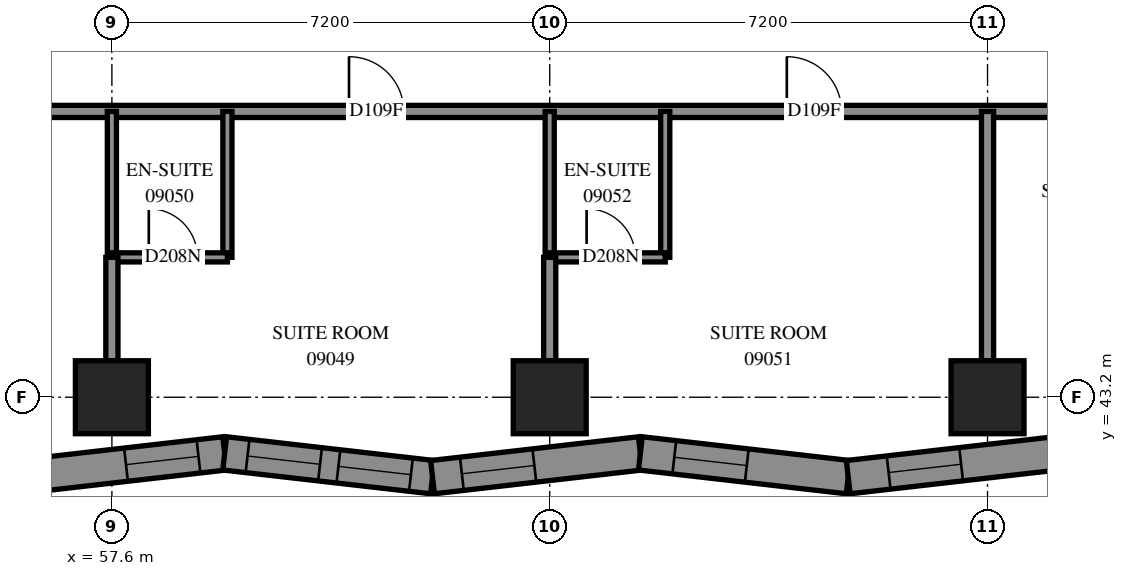
"""IFC4 building model, lengths in metres.
Left out: names, types, materials, properties, quantities, classifications, styles, units other than length and angle.
Written with IfcOpenShell. Run it as: python <this file> out.ifc"""

import sys

from ifc_helpers import new_model, si_unit, direction, frame, frame_2d, origin, origin_2d, place, context, subcontext, project, spatial, polyline, rectangle, outline, extrude, element, fill, save


model = new_model("IFC4")
c1 = context("Model", 3, precision=1e-05, world=origin(), true_north=direction((0.0, 1.0)))
c2 = subcontext(c1, "Body", "Model", "MODEL_VIEW")
j1 = project(units=[si_unit("LENGTHUNIT", "METRE"), si_unit("PLANEANGLEUNIT", "RADIAN")], contexts=[c1])
p1 = place(None, origin())
s1 = spatial("IfcSite", under=j1, at=p1, CompositionType="ELEMENT")
p2 = place(p1, origin())
s2 = spatial("IfcBuilding", under=s1, at=p2, CompositionType="ELEMENT")
p3 = place(p2, frame((0.0, 0.0, 37.2)))
s3 = spatial("IfcBuildingStorey", under=s2, at=p3, CompositionType="ELEMENT", Elevation=37.2)
for number, where, z_axis, x_axis in (
    (1, (57.6, 43.2, 0.0), (0.0, 0.0, 1.0), (1.0, 0.0, 0.0)),
    (2, (64.8, 43.2, 0.0), (0.0, 0.0, 1.0), (1.0, 0.0, 0.0)),
    (3, (72.0, 43.2, 0.0), (0.0, 0.0, 1.0), (1.0, 0.0, 0.0)),
):
    element("IfcColumn", number, at=place(p3, frame(where, z_axis=z_axis, x_axis=x_axis)), inside=s3, PredefinedType="COLUMN", context=c2, shape_type="SweptSolid", body=[
        extrude(rectangle(XDim=1.2, YDim=1.2, at=origin_2d()), origin(), (0.0, 0.0, 1.0), 3.1),
    ])
p4 = place(p3, frame((56.036, 41.886, 0.0), z_axis=(0.0, 0.0, 1.0), x_axis=(0.9935208627, 0.1136498807, 0.0)))
e4 = element("IfcWall", 4, at=p4, inside=s3, PredefinedType="SOLIDWALL", context=c2, shape_type="SweptSolid", body=[
    extrude(outline(polyline([(-0.032, -0.275), (3.409, -0.275), (3.472, 0.275), (0.032, 0.275), (-0.032, -0.275)])), origin(), (0.0, 0.0, 1.0), 3.1),
])
p5 = place(p4, frame((1.807, 0.0, 0.5)))
e5 = element("IfcOpeningElement", 5, at=p5, cuts=e4, PredefinedType="OPENING", context=c2, shape_type="SweptSolid", body=[
    extrude(rectangle(XDim=1.2, YDim=2.45, at=frame_2d((0.6, 1.225))), frame((0.0, 0.285, 0.0), z_axis=(0.0, -1.0, 0.0), x_axis=(1.0, 0.0, 0.0)), (0.0, 0.0, 1.0), 0.57),
])
p6 = place(p3, frame((59.455, 42.277, 0.0), z_axis=(0.0, 0.0, 1.0), x_axis=(0.9935212381, -0.1136465988, 0.0)))
e6 = element("IfcWall", 6, at=p6, inside=s3, PredefinedType="SOLIDWALL", context=c2, shape_type="SweptSolid", body=[
    extrude(outline(polyline([(0.032, -0.275), (3.472, -0.275), (3.409, 0.275), (-0.032, 0.275), (0.032, -0.275)])), origin(), (0.0, 0.0, 1.0), 3.1),
])
p7 = place(p6, frame((0.378, 0.0, 0.5)))
e7 = element("IfcOpeningElement", 7, at=p7, cuts=e6, PredefinedType="OPENING", context=c2, shape_type="SweptSolid", body=[
    extrude(rectangle(XDim=1.2, YDim=2.45, at=frame_2d((0.6, 1.225))), frame((0.0, 0.285, 0.0), z_axis=(0.0, -1.0, 0.0), x_axis=(1.0, 0.0, 0.0)), (0.0, 0.0, 1.0), 0.57),
])
p8 = place(p6, frame((1.883, 0.0, 0.5)))
e8 = element("IfcOpeningElement", 8, at=p8, cuts=e6, PredefinedType="OPENING", context=c2, shape_type="SweptSolid", body=[
    extrude(rectangle(XDim=1.2, YDim=2.45, at=frame_2d((0.6, 1.225))), frame((0.0, 0.285, 0.0), z_axis=(0.0, -1.0, 0.0), x_axis=(1.0, 0.0, 0.0)), (0.0, 0.0, 1.0), 0.57),
])
p9 = place(p3, frame((62.873, 41.886, 0.0), z_axis=(0.0, 0.0, 1.0), x_axis=(0.9935212381, 0.1136465988, 0.0)))
e9 = element("IfcWall", 9, at=p9, inside=s3, PredefinedType="SOLIDWALL", context=c2, shape_type="SweptSolid", body=[
    extrude(outline(polyline([(-0.032, -0.275), (3.409, -0.275), (3.472, 0.275), (0.032, 0.275), (-0.032, -0.275)])), origin(), (0.0, 0.0, 1.0), 3.1),
])
p10 = place(p9, frame((0.486, 0.0, 0.5)))
e10 = element("IfcOpeningElement", 10, at=p10, cuts=e9, PredefinedType="OPENING", context=c2, shape_type="SweptSolid", body=[
    extrude(rectangle(XDim=1.2, YDim=2.45, at=frame_2d((0.6, 1.225))), frame((0.0, 0.285, 0.0), z_axis=(0.0, -1.0, 0.0), x_axis=(1.0, 0.0, 0.0)), (0.0, 0.0, 1.0), 0.57),
])
p11 = place(p3, frame((66.291, 42.277, 0.0), z_axis=(0.0, 0.0, 1.0), x_axis=(0.9935212381, -0.1136465988, 0.0)))
e11 = element("IfcWall", 11, at=p11, inside=s3, PredefinedType="SOLIDWALL", context=c2, shape_type="SweptSolid", body=[
    extrude(outline(polyline([(0.032, -0.275), (3.472, -0.275), (3.409, 0.275), (-0.032, 0.275), (0.032, -0.275)])), origin(), (0.0, 0.0, 1.0), 3.1),
])
p12 = place(p11, frame((0.561, 0.0, 0.5)))
e12 = element("IfcOpeningElement", 12, at=p12, cuts=e11, PredefinedType="OPENING", context=c2, shape_type="SweptSolid", body=[
    extrude(rectangle(XDim=1.2, YDim=2.45, at=frame_2d((0.6, 1.225))), frame((0.0, 0.285, 0.0), z_axis=(0.0, -1.0, 0.0), x_axis=(1.0, 0.0, 0.0)), (0.0, 0.0, 1.0), 0.57),
])
p13 = place(p3, frame((69.709, 41.886, 0.0), z_axis=(0.0, 0.0, 1.0), x_axis=(0.9935208506, 0.1136499866, 0.0)))
e13 = element("IfcWall", 13, at=p13, inside=s3, PredefinedType="SOLIDWALL", context=c2, shape_type="SweptSolid", body=[
    extrude(outline(polyline([(-0.032, -0.275), (3.409, -0.275), (3.519, 0.275), (0.032, 0.275), (-0.032, -0.275)])), origin(), (0.0, 0.0, 1.0), 3.1),
])
p14 = place(p13, frame((0.669, 0.0, 0.5)))
e14 = element("IfcOpeningElement", 14, at=p14, cuts=e13, PredefinedType="OPENING", context=c2, shape_type="SweptSolid", body=[
    extrude(rectangle(XDim=1.2, YDim=2.45, at=frame_2d((0.6, 1.225))), frame((0.0, 0.285, 0.0), z_axis=(0.0, -1.0, 0.0), x_axis=(1.0, 0.0, 0.0)), (0.0, 0.0, 1.0), 0.57),
])
p15 = place(p3, frame((55.1, 47.9, 0.0), z_axis=(0.0, 0.0, 1.0), x_axis=(1.0, 0.0, 0.0)))
e15 = element("IfcWall", 15, at=p15, inside=s3, PredefinedType="PARTITIONING", context=c2, shape_type="SweptSolid", body=[
    extrude(rectangle(XDim=19.204, YDim=0.2, at=frame_2d((9.602, 0.0))), origin(), (0.0, 0.0, 1.0), 3.1),
])
p16 = place(p15, frame((6.399, 0.0, 0.0)))
e16 = element("IfcOpeningElement", 16, at=p16, cuts=e15, PredefinedType="OPENING", context=c2, shape_type="SweptSolid", body=[
    extrude(rectangle(XDim=0.9, YDim=2.1, at=frame_2d((0.45, 1.05))), frame((0.0, 0.11, 0.0), z_axis=(0.0, -1.0, 0.0), x_axis=(1.0, 0.0, 0.0)), (0.0, 0.0, 1.0), 0.22),
])
p17 = place(p15, frame((13.599, 0.0, 0.0)))
e17 = element("IfcOpeningElement", 17, at=p17, cuts=e15, PredefinedType="OPENING", context=c2, shape_type="SweptSolid", body=[
    extrude(rectangle(XDim=0.9, YDim=2.1, at=frame_2d((0.45, 1.05))), frame((0.0, 0.11, 0.0), z_axis=(0.0, -1.0, 0.0), x_axis=(1.0, 0.0, 0.0)), (0.0, 0.0, 1.0), 0.22),
])
p18 = place(p3, frame((72.0, 43.8, 0.0), z_axis=(0.0, 0.0, 1.0), x_axis=(0.0, 1.0, 0.0)))
e18 = element("IfcWall", 18, at=p18, inside=s3, PredefinedType="PARTITIONING", context=c2, shape_type="SweptSolid", body=[
    extrude(rectangle(XDim=4.1, YDim=0.2, at=frame_2d((2.05, 0.0))), origin(), (0.0, 0.0, 1.0), 3.1),
])
for number, where, z_axis, x_axis in (
    (19, (59.5, 45.5, 0.0), (0.0, 0.0, 1.0), (0.0, 1.0, 0.0)),
    (20, (57.6, 45.5, 0.0), (0.0, 0.0, 1.0), (0.0, 1.0, 0.0)),
    (21, (66.7, 45.5, 0.0), (0.0, 0.0, 1.0), (0.0, 1.0, 0.0)),
    (22, (64.8, 45.5, 0.0), (0.0, 0.0, 1.0), (0.0, 1.0, 0.0)),
):
    element("IfcWall", number, at=place(p3, frame(where, z_axis=z_axis, x_axis=x_axis)), inside=s3, PredefinedType="PARTITIONING", context=c2, shape_type="SweptSolid", body=[
        extrude(rectangle(XDim=2.4, YDim=0.15, at=frame_2d((1.2, 0.0))), origin(), (0.0, 0.0, 1.0), 3.1),
    ])
p19 = place(p3, frame((64.8, 45.5, 0.0), z_axis=(0.0, 0.0, 1.0), x_axis=(1.0, 0.0, 0.0)))
e23 = element("IfcWall", 23, at=p19, inside=s3, PredefinedType="PARTITIONING", context=c2, shape_type="SweptSolid", body=[
    extrude(rectangle(XDim=1.9, YDim=0.15, at=frame_2d((0.95, 0.0))), origin(), (0.0, 0.0, 1.0), 3.1),
])
p20 = place(p19, frame((0.607, 0.0, 0.0)))
e24 = element("IfcOpeningElement", 24, at=p20, cuts=e23, PredefinedType="OPENING", context=c2, shape_type="SweptSolid", body=[
    extrude(rectangle(XDim=0.8, YDim=2.1, at=frame_2d((0.4, 1.05))), frame((0.0, 0.085, 0.0), z_axis=(0.0, -1.0, 0.0), x_axis=(1.0, 0.0, 0.0)), (0.0, 0.0, 1.0), 0.17),
])
p21 = place(p3, frame((57.6, 45.5, 0.0), z_axis=(0.0, 0.0, 1.0), x_axis=(1.0, 0.0, 0.0)))
e25 = element("IfcWall", 25, at=p21, inside=s3, PredefinedType="PARTITIONING", context=c2, shape_type="SweptSolid", body=[
    extrude(rectangle(XDim=1.9, YDim=0.15, at=frame_2d((0.95, 0.0))), origin(), (0.0, 0.0, 1.0), 3.1),
])
p22 = place(p21, frame((0.607, 0.0, 0.0)))
e26 = element("IfcOpeningElement", 26, at=p22, cuts=e25, PredefinedType="OPENING", context=c2, shape_type="SweptSolid", body=[
    extrude(rectangle(XDim=0.8, YDim=2.1, at=frame_2d((0.4, 1.05))), frame((0.0, 0.085, 0.0), z_axis=(0.0, -1.0, 0.0), x_axis=(1.0, 0.0, 0.0)), (0.0, 0.0, 1.0), 0.17),
])
for number, where, z_axis, x_axis in (
    (27, (57.6, 43.8, 0.0), (0.0, 0.0, 1.0), (0.0, 1.0, 0.0)),
    (28, (64.8, 43.8, 0.0), (0.0, 0.0, 1.0), (0.0, 1.0, 0.0)),
):
    element("IfcWall", number, at=place(p3, frame(where, z_axis=z_axis, x_axis=x_axis)), inside=s3, PredefinedType="PARTITIONING", context=c2, shape_type="SweptSolid", body=[
        extrude(rectangle(XDim=1.7, YDim=0.2, at=frame_2d((0.85, 0.0))), origin(), (0.0, 0.0, 1.0), 3.1),
    ])
p23 = place(p5, origin())
e29 = element("IfcWindow", 29, at=p23, inside=s3, PartitioningType="SINGLE_PANEL", PredefinedType="WINDOW", context=c2, shape_type="SweptSolid", body=[
    extrude(rectangle(XDim=1.2, YDim=2.45, at=frame_2d((0.6, 1.225))), frame((0.0, 0.155, 0.0), z_axis=(0.0, -1.0, 0.0), x_axis=(1.0, 0.0, 0.0)), (0.0, 0.0, 1.0), 0.06),
])
fill(e5, e29)
p24 = place(p7, origin())
e30 = element("IfcWindow", 30, at=p24, inside=s3, PartitioningType="SINGLE_PANEL", PredefinedType="WINDOW", context=c2, shape_type="SweptSolid", body=[
    extrude(rectangle(XDim=1.2, YDim=2.45, at=frame_2d((0.6, 1.225))), frame((0.0, 0.155, 0.0), z_axis=(0.0, -1.0, 0.0), x_axis=(1.0, 0.0, 0.0)), (0.0, 0.0, 1.0), 0.06),
])
fill(e7, e30)
p25 = place(p8, origin())
e31 = element("IfcWindow", 31, at=p25, inside=s3, PartitioningType="SINGLE_PANEL", PredefinedType="WINDOW", context=c2, shape_type="SweptSolid", body=[
    extrude(rectangle(XDim=1.2, YDim=2.45, at=frame_2d((0.6, 1.225))), frame((0.0, 0.155, 0.0), z_axis=(0.0, -1.0, 0.0), x_axis=(1.0, 0.0, 0.0)), (0.0, 0.0, 1.0), 0.06),
])
fill(e8, e31)
p26 = place(p10, origin())
e32 = element("IfcWindow", 32, at=p26, inside=s3, PartitioningType="SINGLE_PANEL", PredefinedType="WINDOW", context=c2, shape_type="SweptSolid", body=[
    extrude(rectangle(XDim=1.2, YDim=2.45, at=frame_2d((0.6, 1.225))), frame((0.0, 0.155, 0.0), z_axis=(0.0, -1.0, 0.0), x_axis=(1.0, 0.0, 0.0)), (0.0, 0.0, 1.0), 0.06),
])
fill(e10, e32)
p27 = place(p12, origin())
e33 = element("IfcWindow", 33, at=p27, inside=s3, PartitioningType="SINGLE_PANEL", PredefinedType="WINDOW", context=c2, shape_type="SweptSolid", body=[
    extrude(rectangle(XDim=1.2, YDim=2.45, at=frame_2d((0.6, 1.225))), frame((0.0, 0.155, 0.0), z_axis=(0.0, -1.0, 0.0), x_axis=(1.0, 0.0, 0.0)), (0.0, 0.0, 1.0), 0.06),
])
fill(e12, e33)
p28 = place(p14, origin())
e34 = element("IfcWindow", 34, at=p28, inside=s3, PartitioningType="SINGLE_PANEL", PredefinedType="WINDOW", context=c2, shape_type="SweptSolid", body=[
    extrude(rectangle(XDim=1.2, YDim=2.45, at=frame_2d((0.6, 1.225))), frame((0.0, 0.155, 0.0), z_axis=(0.0, -1.0, 0.0), x_axis=(1.0, 0.0, 0.0)), (0.0, 0.0, 1.0), 0.06),
])
fill(e14, e34)
p29 = place(p16, origin())
e35 = element("IfcDoor", 35, at=p29, inside=s3, OperationType="SINGLE_SWING_LEFT", PredefinedType="DOOR", context=c2, shape_type="SweptSolid", body=[
    extrude(rectangle(XDim=0.9, YDim=2.1, at=frame_2d((0.45, 1.05))), frame((0.0, 0.025, 0.0), z_axis=(0.0, -1.0, 0.0), x_axis=(1.0, 0.0, 0.0)), (0.0, 0.0, 1.0), 0.05),
])
fill(e16, e35)
p30 = place(p22, origin())
e36 = element("IfcDoor", 36, at=p30, inside=s3, OperationType="SINGLE_SWING_RIGHT", PredefinedType="DOOR", context=c2, shape_type="SweptSolid", body=[
    extrude(rectangle(XDim=0.8, YDim=2.1, at=frame_2d((0.4, 1.05))), frame((0.0, 0.025, 0.0), z_axis=(0.0, -1.0, 0.0), x_axis=(1.0, 0.0, 0.0)), (0.0, 0.0, 1.0), 0.05),
])
fill(e26, e36)
p31 = place(p17, origin())
e37 = element("IfcDoor", 37, at=p31, inside=s3, OperationType="SINGLE_SWING_LEFT", PredefinedType="DOOR", context=c2, shape_type="SweptSolid", body=[
    extrude(rectangle(XDim=0.9, YDim=2.1, at=frame_2d((0.45, 1.05))), frame((0.0, 0.025, 0.0), z_axis=(0.0, -1.0, 0.0), x_axis=(1.0, 0.0, 0.0)), (0.0, 0.0, 1.0), 0.05),
])
fill(e17, e37)
p32 = place(p20, origin())
e38 = element("IfcDoor", 38, at=p32, inside=s3, OperationType="SINGLE_SWING_RIGHT", PredefinedType="DOOR", context=c2, shape_type="SweptSolid", body=[
    extrude(rectangle(XDim=0.8, YDim=2.1, at=frame_2d((0.4, 1.05))), frame((0.0, 0.025, 0.0), z_axis=(0.0, -1.0, 0.0), x_axis=(1.0, 0.0, 0.0)), (0.0, 0.0, 1.0), 0.05),
])
fill(e24, e38)
save(model, sys.argv[1])
